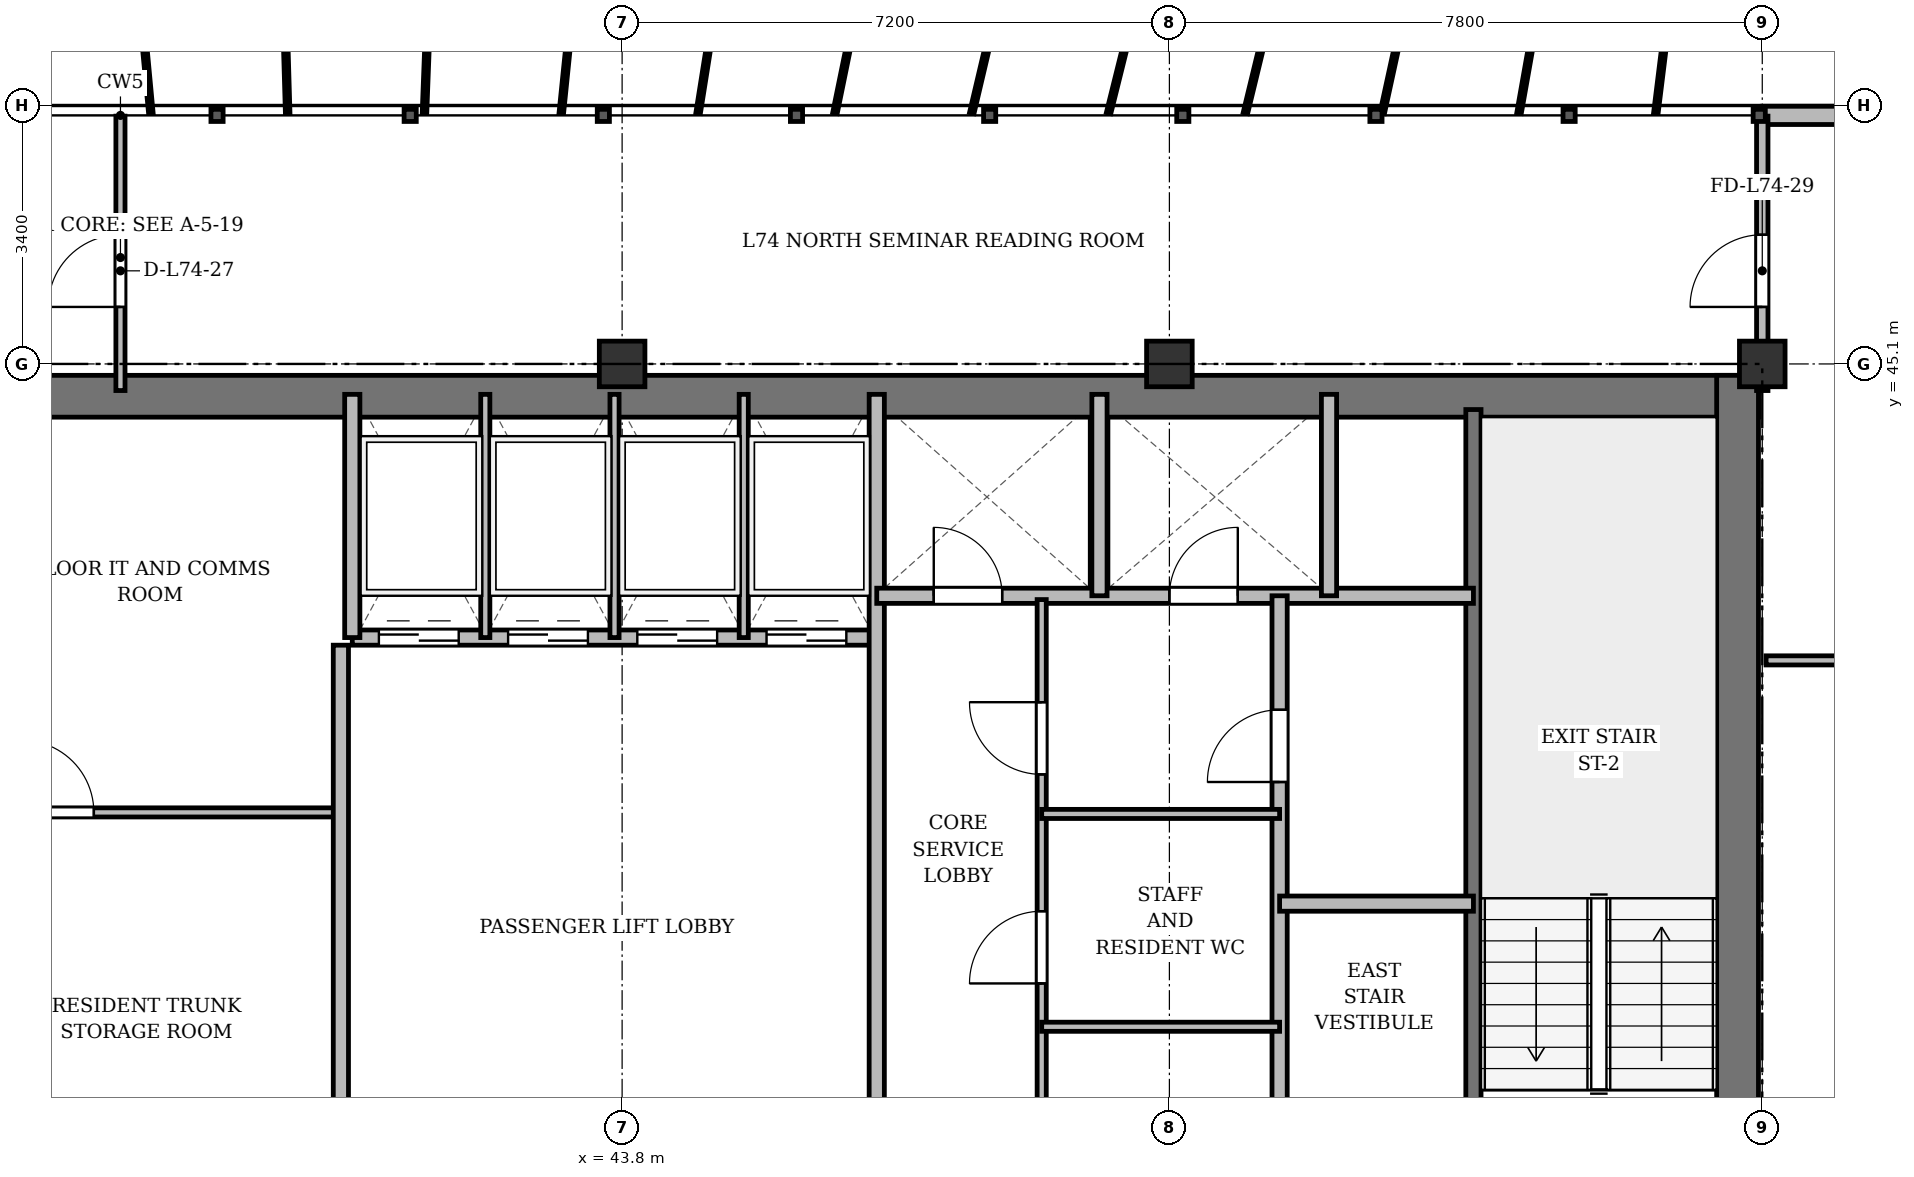
"""IFC4 building model, lengths in metres.
Left out: names, types, materials, properties, quantities, classifications, styles, units other than length and angle.
Written with IfcOpenShell. Run it as: python <this file> out.ifc"""

import sys

from ifc_helpers import new_model, si_unit, direction, frame, frame_2d, origin, origin_2d, place, context, subcontext, project, spatial, rectangle, extrude, source, transform, mapped, element, fill, save


model = new_model("IFC4")
c1 = context("Model", 3, precision=1e-05, world=origin(), true_north=direction((0.0, 1.0)))
c2 = subcontext(c1, "Body", "Model", "MODEL_VIEW")
j1 = project(units=[si_unit("LENGTHUNIT", "METRE"), si_unit("PLANEANGLEUNIT", "RADIAN")], contexts=[c1])
p1 = place(None, origin())
s1 = spatial("IfcSite", under=j1, at=p1, CompositionType="ELEMENT")
p2 = place(p1, origin())
s2 = spatial("IfcBuilding", under=s1, at=p2, CompositionType="ELEMENT")
p3 = place(p2, frame((0.0, 0.0, 284.7)))
s3 = spatial("IfcBuildingStorey", under=s2, at=p3, CompositionType="ELEMENT", Elevation=284.7)
m1 = source(origin(), c2, "Body", "SweptSolid", [
    extrude(rectangle(XDim=0.6, YDim=0.6, at=origin_2d()), origin(), (0.0, 0.0, 1.0), 3.6),
])
for number, where, z_axis, x_axis in (
    (1, (43.8, 45.1, 0.0), (0.0, 0.0, 1.0), (1.0, 0.0, 0.0)),
    (2, (51.0, 45.1, 0.0), (0.0, 0.0, 1.0), (1.0, 0.0, 0.0)),
    (3, (58.8, 45.1, 0.0), (0.0, 0.0, 1.0), (1.0, 0.0, 0.0)),
):
    element("IfcColumn", number, at=place(p3, frame(where, z_axis=z_axis, x_axis=x_axis)), inside=s3, PredefinedType="COLUMN", context=c2, shape_type="MappedRepresentation", body=[
        mapped(m1, transform((0.0, 0.0, 0.0), x_axis=(1.0, 0.0, 0.0), y_axis=(0.0, 1.0, 0.0), z_axis=(0.0, 0.0, 1.0), scale=1.0)),
    ])
p4 = place(p3, frame((58.8, 48.37, 0.0), z_axis=(0.0, 0.0, 1.0), x_axis=(1.0, 0.0, 0.0)))
e4 = element("IfcWall", 4, at=p4, inside=s3, PredefinedType="SOLIDWALL", context=c2, shape_type="SweptSolid", body=[
    extrude(rectangle(XDim=4.3, YDim=0.24, at=frame_2d((2.15, 0.0))), origin(), (0.0, 0.0, 1.0), 3.37),
])
p5 = place(p4, frame((1.46, 0.0, 0.9)))
e5 = element("IfcOpeningElement", 5, at=p5, cuts=e4, PredefinedType="OPENING", context=c2, shape_type="SweptSolid", body=[
    extrude(rectangle(XDim=1.2, YDim=1.65, at=frame_2d((0.6, 0.825))), frame((0.0, 0.13, 0.0), z_axis=(0.0, -1.0, 0.0), x_axis=(1.0, 0.0, 0.0)), (0.0, 0.0, 1.0), 0.26),
])
p6 = place(p3, frame((15.65, 44.675, 0.0), z_axis=(0.0, 0.0, 1.0), x_axis=(1.0, 0.0, 0.0)))
e6 = element("IfcWall", 6, at=p6, inside=s3, PredefinedType="SHEAR", context=c2, shape_type="SweptSolid", body=[
    extrude(rectangle(XDim=43.1, YDim=0.55, at=frame_2d((21.55, 0.0))), origin(), (0.0, 0.0, 1.0), 3.37),
])
p7 = place(p3, frame((58.475, 33.4, 0.0), z_axis=(0.0, 0.0, 1.0), x_axis=(0.0, 1.0, 0.0)))
e7 = element("IfcWall", 7, at=p7, inside=s3, PredefinedType="SHEAR", context=c2, shape_type="SweptSolid", body=[
    extrude(rectangle(XDim=11.55, YDim=0.55, at=frame_2d((5.775, 0.0))), origin(), (0.0, 0.0, 1.0), 3.37),
])
p8 = place(p3, frame((55.0, 33.4, 0.0), z_axis=(0.0, 0.0, 1.0), x_axis=(0.0, 1.0, 0.0)))
e8 = element("IfcWall", 8, at=p8, inside=s3, PredefinedType="SHEAR", context=c2, shape_type="SweptSolid", body=[
    extrude(rectangle(XDim=11.1, YDim=0.2, at=frame_2d((5.55, 0.0))), origin(), (0.0, 0.0, 1.0), 3.37),
])
p9 = place(p8, frame((0.85, 0.0, 0.0)))
e9 = element("IfcOpeningElement", 9, at=p9, cuts=e8, PredefinedType="OPENING", context=c2, shape_type="SweptSolid", body=[
    extrude(rectangle(XDim=1.1, YDim=2.15, at=frame_2d((0.55, 1.075))), frame((0.0, 0.11, 0.0), z_axis=(0.0, -1.0, 0.0), x_axis=(1.0, 0.0, 0.0)), (0.0, 0.0, 1.0), 0.22),
])
p10 = place(p3, frame((33.3, 39.2, 0.0), z_axis=(0.0, 0.0, 1.0), x_axis=(1.0, 0.0, 0.0)))
e10 = element("IfcWall", 10, at=p10, inside=s3, PredefinedType="PARTITIONING", context=c2, shape_type="SweptSolid", body=[
    extrude(rectangle(XDim=6.8, YDim=0.12, at=frame_2d((3.4, 0.0))), origin(), (0.0, 0.0, 1.0), 3.37),
])
p11 = place(p10, frame((2.6, 0.0, 0.0)))
e11 = element("IfcOpeningElement", 11, at=p11, cuts=e10, PredefinedType="OPENING", context=c2, shape_type="SweptSolid", body=[
    extrude(rectangle(XDim=0.95, YDim=2.15, at=frame_2d((0.475, 1.075))), frame((0.0, 0.07, 0.0), z_axis=(0.0, -1.0, 0.0), x_axis=(1.0, 0.0, 0.0)), (0.0, 0.0, 1.0), 0.14),
])
p12 = place(p3, frame((40.1, 33.4, 0.0), z_axis=(0.0, 0.0, 1.0), x_axis=(0.0, 1.0, 0.0)))
e12 = element("IfcWall", 12, at=p12, inside=s3, PredefinedType="SOLIDWALL", context=c2, shape_type="SweptSolid", body=[
    extrude(rectangle(XDim=8.0, YDim=0.2, at=frame_2d((4.0, 0.0))), origin(), (0.0, 0.0, 1.0), 2.92),
])
p13 = place(p3, frame((40.25, 41.5, 0.0), z_axis=(0.0, 0.0, 1.0), x_axis=(1.0, 0.0, 0.0)))
e13 = element("IfcWall", 13, at=p13, inside=s3, PredefinedType="SOLIDWALL", context=c2, shape_type="SweptSolid", body=[
    extrude(rectangle(XDim=6.9, YDim=0.2, at=frame_2d((3.45, 0.0))), origin(), (0.0, 0.0, 1.0), 3.37),
])
p14 = place(p13, frame((0.35, 0.0, 0.0)))
e14 = element("IfcOpeningElement", 14, at=p14, cuts=e13, PredefinedType="OPENING", context=c2, shape_type="SweptSolid", body=[
    extrude(rectangle(XDim=1.05, YDim=2.15, at=frame_2d((0.525, 1.075))), frame((0.0, 0.11, 0.0), z_axis=(0.0, -1.0, 0.0), x_axis=(1.0, 0.0, 0.0)), (0.0, 0.0, 1.0), 0.22),
])
p15 = place(p13, frame((2.05, 0.0, 0.0)))
e15 = element("IfcOpeningElement", 15, at=p15, cuts=e13, PredefinedType="OPENING", context=c2, shape_type="SweptSolid", body=[
    extrude(rectangle(XDim=1.05, YDim=2.15, at=frame_2d((0.525, 1.075))), frame((0.0, 0.11, 0.0), z_axis=(0.0, -1.0, 0.0), x_axis=(1.0, 0.0, 0.0)), (0.0, 0.0, 1.0), 0.22),
])
p16 = place(p13, frame((3.75, 0.0, 0.0)))
e16 = element("IfcOpeningElement", 16, at=p16, cuts=e13, PredefinedType="OPENING", context=c2, shape_type="SweptSolid", body=[
    extrude(rectangle(XDim=1.05, YDim=2.15, at=frame_2d((0.525, 1.075))), frame((0.0, 0.11, 0.0), z_axis=(0.0, -1.0, 0.0), x_axis=(1.0, 0.0, 0.0)), (0.0, 0.0, 1.0), 0.22),
])
p17 = place(p13, frame((5.45, 0.0, 0.0)))
e17 = element("IfcOpeningElement", 17, at=p17, cuts=e13, PredefinedType="OPENING", context=c2, shape_type="SweptSolid", body=[
    extrude(rectangle(XDim=1.05, YDim=2.15, at=frame_2d((0.525, 1.075))), frame((0.0, 0.11, 0.0), z_axis=(0.0, -1.0, 0.0), x_axis=(1.0, 0.0, 0.0)), (0.0, 0.0, 1.0), 0.22),
])
p18 = place(p3, frame((40.25, 41.5, 0.0), z_axis=(0.0, 0.0, 1.0), x_axis=(0.0, 1.0, 0.0)))
e18 = element("IfcWall", 18, at=p18, inside=s3, PredefinedType="SOLIDWALL", context=c2, shape_type="SweptSolid", body=[
    extrude(rectangle(XDim=3.2, YDim=0.2, at=frame_2d((1.6, 0.0))), origin(), (0.0, 0.0, 1.0), 3.37),
])
for number, where, z_axis, x_axis in (
    (19, (42.0, 41.5, 0.0), (0.0, 0.0, 1.0), (0.0, 1.0, 0.0)),
    (20, (43.7, 41.5, 0.0), (0.0, 0.0, 1.0), (0.0, 1.0, 0.0)),
    (21, (45.4, 41.5, 0.0), (0.0, 0.0, 1.0), (0.0, 1.0, 0.0)),
):
    element("IfcWall", number, at=place(p3, frame(where, z_axis=z_axis, x_axis=x_axis)), inside=s3, PredefinedType="PARTITIONING", context=c2, shape_type="SweptSolid", body=[
        extrude(rectangle(XDim=3.2, YDim=0.12, at=frame_2d((1.6, 0.0))), origin(), (0.0, 0.0, 1.0), 3.37),
    ])
p19 = place(p3, frame((47.15, 33.4, 0.0), z_axis=(0.0, 0.0, 1.0), x_axis=(0.0, 1.0, 0.0)))
e22 = element("IfcWall", 22, at=p19, inside=s3, PredefinedType="SOLIDWALL", context=c2, shape_type="SweptSolid", body=[
    extrude(rectangle(XDim=11.3, YDim=0.2, at=frame_2d((5.65, 0.0))), origin(), (0.0, 0.0, 1.0), 2.92),
])
p20 = place(p3, frame((47.15, 42.05, 0.0), z_axis=(0.0, 0.0, 1.0), x_axis=(1.0, 0.0, 0.0)))
e23 = element("IfcWall", 23, at=p20, inside=s3, PredefinedType="SOLIDWALL", context=c2, shape_type="SweptSolid", body=[
    extrude(rectangle(XDim=7.85, YDim=0.2, at=frame_2d((3.925, 0.0))), origin(), (0.0, 0.0, 1.0), 2.87),
])
p21 = place(p20, frame((0.75, 0.0, 0.0)))
e24 = element("IfcOpeningElement", 24, at=p21, cuts=e23, PredefinedType="OPENING", context=c2, shape_type="SweptSolid", body=[
    extrude(rectangle(XDim=0.9, YDim=2.1, at=frame_2d((0.45, 1.05))), frame((0.0, 0.11, 0.0), z_axis=(0.0, -1.0, 0.0), x_axis=(1.0, 0.0, 0.0)), (0.0, 0.0, 1.0), 0.22),
])
p22 = place(p20, frame((3.85, 0.0, 0.0)))
e25 = element("IfcOpeningElement", 25, at=p22, cuts=e23, PredefinedType="OPENING", context=c2, shape_type="SweptSolid", body=[
    extrude(rectangle(XDim=0.9, YDim=2.1, at=frame_2d((0.45, 1.05))), frame((0.0, 0.11, 0.0), z_axis=(0.0, -1.0, 0.0), x_axis=(1.0, 0.0, 0.0)), (0.0, 0.0, 1.0), 0.22),
])
for number, where, z_axis, x_axis in (
    (26, (50.08, 42.05, 0.0), (0.0, 0.0, 1.0), (0.0, 1.0, 0.0)),
    (27, (53.1, 42.05, 0.0), (0.0, 0.0, 1.0), (0.0, 1.0, 0.0)),
):
    element("IfcWall", number, at=place(p3, frame(where, z_axis=z_axis, x_axis=x_axis)), inside=s3, PredefinedType="SOLIDWALL", context=c2, shape_type="SweptSolid", body=[
        extrude(rectangle(XDim=2.65, YDim=0.2, at=frame_2d((1.325, 0.0))), origin(), (0.0, 0.0, 1.0), 3.37),
    ])
p23 = place(p3, frame((52.45, 33.4, 0.0), z_axis=(0.0, 0.0, 1.0), x_axis=(0.0, 1.0, 0.0)))
e28 = element("IfcWall", 28, at=p23, inside=s3, PredefinedType="PARTITIONING", context=c2, shape_type="SweptSolid", body=[
    extrude(rectangle(XDim=8.65, YDim=0.2, at=frame_2d((4.325, 0.0))), origin(), (0.0, 0.0, 1.0), 2.92),
])
p24 = place(p23, frame((6.2, 0.0, 0.0)))
e29 = element("IfcOpeningElement", 29, at=p24, cuts=e28, PredefinedType="OPENING", context=c2, shape_type="SweptSolid", body=[
    extrude(rectangle(XDim=0.95, YDim=2.15, at=frame_2d((0.475, 1.075))), frame((0.0, 0.11, 0.0), z_axis=(0.0, -1.0, 0.0), x_axis=(1.0, 0.0, 0.0)), (0.0, 0.0, 1.0), 0.22),
])
p25 = place(p3, frame((52.45, 38.0, 0.0), z_axis=(0.0, 0.0, 1.0), x_axis=(1.0, 0.0, 0.0)))
e30 = element("IfcWall", 30, at=p25, inside=s3, PredefinedType="PARTITIONING", context=c2, shape_type="SweptSolid", body=[
    extrude(rectangle(XDim=2.55, YDim=0.2, at=frame_2d((1.275, 0.0))), origin(), (0.0, 0.0, 1.0), 3.37),
])
p26 = place(p3, frame((49.32, 33.4, 0.0), z_axis=(0.0, 0.0, 1.0), x_axis=(0.0, 1.0, 0.0)))
e31 = element("IfcWall", 31, at=p26, inside=s3, PredefinedType="PARTITIONING", context=c2, shape_type="SweptSolid", body=[
    extrude(rectangle(XDim=8.6, YDim=0.12, at=frame_2d((4.3, 0.0))), origin(), (0.0, 0.0, 1.0), 2.92),
])
p27 = place(p26, frame((0.85, 0.0, 0.0)))
e32 = element("IfcOpeningElement", 32, at=p27, cuts=e31, PredefinedType="OPENING", context=c2, shape_type="SweptSolid", body=[
    extrude(rectangle(XDim=0.95, YDim=2.15, at=frame_2d((0.475, 1.075))), frame((0.0, 0.07, 0.0), z_axis=(0.0, -1.0, 0.0), x_axis=(1.0, 0.0, 0.0)), (0.0, 0.0, 1.0), 0.14),
])
p28 = place(p26, frame((3.55, 0.0, 0.0)))
e33 = element("IfcOpeningElement", 33, at=p28, cuts=e31, PredefinedType="OPENING", context=c2, shape_type="SweptSolid", body=[
    extrude(rectangle(XDim=0.95, YDim=2.15, at=frame_2d((0.475, 1.075))), frame((0.0, 0.07, 0.0), z_axis=(0.0, -1.0, 0.0), x_axis=(1.0, 0.0, 0.0)), (0.0, 0.0, 1.0), 0.14),
])
p29 = place(p26, frame((6.3, 0.0, 0.0)))
e34 = element("IfcOpeningElement", 34, at=p29, cuts=e31, PredefinedType="OPENING", context=c2, shape_type="SweptSolid", body=[
    extrude(rectangle(XDim=0.95, YDim=2.15, at=frame_2d((0.475, 1.075))), frame((0.0, 0.07, 0.0), z_axis=(0.0, -1.0, 0.0), x_axis=(1.0, 0.0, 0.0)), (0.0, 0.0, 1.0), 0.14),
])
for number, where, z_axis, x_axis in (
    (35, (49.32, 36.38, 0.0), (0.0, 0.0, 1.0), (1.0, 0.0, 0.0)),
    (36, (49.32, 39.18, 0.0), (0.0, 0.0, 1.0), (1.0, 0.0, 0.0)),
):
    element("IfcWall", number, at=place(p3, frame(where, z_axis=z_axis, x_axis=x_axis)), inside=s3, PredefinedType="PARTITIONING", context=c2, shape_type="SweptSolid", body=[
        extrude(rectangle(XDim=3.13, YDim=0.12, at=frame_2d((1.565, 0.0))), origin(), (0.0, 0.0, 1.0), 2.87),
    ])
p30 = place(p3, frame((58.85, 41.2, 0.0), z_axis=(0.0, 0.0, 1.0), x_axis=(1.0, 0.0, 0.0)))
e37 = element("IfcWall", 37, at=p30, inside=s3, PredefinedType="PARTITIONING", context=c2, shape_type="SweptSolid", body=[
    extrude(rectangle(XDim=7.05, YDim=0.12, at=frame_2d((3.525, 0.0))), origin(), (0.0, 0.0, 1.0), 2.87),
])
p31 = place(p30, frame((2.958, 0.0, 0.0)))
e38 = element("IfcOpeningElement", 38, at=p31, cuts=e37, PredefinedType="OPENING", context=c2, shape_type="SweptSolid", body=[
    extrude(rectangle(XDim=0.95, YDim=2.15, at=frame_2d((0.475, 1.075))), frame((0.0, 0.07, 0.0), z_axis=(0.0, -1.0, 0.0), x_axis=(1.0, 0.0, 0.0)), (0.0, 0.0, 1.0), 0.14),
])
p32 = place(p3, frame((37.2, 44.75, 0.0), z_axis=(0.0, 0.0, 1.0), x_axis=(0.0, 1.0, 0.0)))
e39 = element("IfcWall", 39, at=p32, inside=s3, PredefinedType="PARTITIONING", context=c2, shape_type="SweptSolid", body=[
    extrude(rectangle(XDim=3.61, YDim=0.12, at=frame_2d((1.805, 0.0))), origin(), (0.0, 0.0, 1.0), 2.92),
])
p33 = place(p32, frame((1.1, 0.0, 0.0)))
e40 = element("IfcOpeningElement", 40, at=p33, cuts=e39, PredefinedType="OPENING", context=c2, shape_type="SweptSolid", body=[
    extrude(rectangle(XDim=0.95, YDim=2.15, at=frame_2d((0.475, 1.075))), frame((0.0, 0.07, 0.0), z_axis=(0.0, -1.0, 0.0), x_axis=(1.0, 0.0, 0.0)), (0.0, 0.0, 1.0), 0.14),
])
p34 = place(p3, frame((58.8, 44.75, 0.0), z_axis=(0.0, 0.0, 1.0), x_axis=(0.0, 1.0, 0.0)))
e41 = element("IfcWall", 41, at=p34, inside=s3, PredefinedType="PARTITIONING", context=c2, shape_type="SweptSolid", body=[
    extrude(rectangle(XDim=3.61, YDim=0.15, at=frame_2d((1.805, 0.0))), origin(), (0.0, 0.0, 1.0), 2.87),
])
p35 = place(p34, frame((1.1, 0.0, 0.0)))
e42 = element("IfcOpeningElement", 42, at=p35, cuts=e41, PredefinedType="OPENING", context=c2, shape_type="SweptSolid", body=[
    extrude(rectangle(XDim=0.95, YDim=2.15, at=frame_2d((0.475, 1.075))), frame((0.0, 0.085, 0.0), z_axis=(0.0, -1.0, 0.0), x_axis=(1.0, 0.0, 0.0)), (0.0, 0.0, 1.0), 0.17),
])
m2 = source(origin(), c2, "Body", "SweptSolid", [
    extrude(rectangle(XDim=0.95, YDim=2.15, at=frame_2d((0.475, 1.075))), frame((0.0, 0.025, 0.0), z_axis=(0.0, -1.0, 0.0), x_axis=(1.0, 0.0, 0.0)), (0.0, 0.0, 1.0), 0.05),
])
p36 = place(p11, origin())
e43 = element("IfcDoor", 43, at=p36, inside=s3, OperationType="SINGLE_SWING_LEFT", PredefinedType="DOOR", context=c2, shape_type="MappedRepresentation", body=[
    mapped(m2, transform((0.0, 0.0, 0.0), x_axis=(1.0, 0.0, 0.0), y_axis=(0.0, 1.0, 0.0), z_axis=(0.0, 0.0, 1.0), scale=1.0)),
])
fill(e11, e43)
m3 = source(origin(), c2, "Body", "SweptSolid", [
    extrude(rectangle(XDim=1.05, YDim=2.15, at=frame_2d((0.525, 1.075))), frame((0.0, 0.025, 0.0), z_axis=(0.0, -1.0, 0.0), x_axis=(1.0, 0.0, 0.0)), (0.0, 0.0, 1.0), 0.05),
])
p37 = place(p14, origin())
e44 = element("IfcDoor", 44, at=p37, inside=s3, OperationType="DOUBLE_DOOR_SLIDING", PredefinedType="DOOR", context=c2, shape_type="MappedRepresentation", body=[
    mapped(m3, transform((0.0, 0.0, 0.0), x_axis=(1.0, 0.0, 0.0), y_axis=(0.0, 1.0, 0.0), z_axis=(0.0, 0.0, 1.0), scale=1.0)),
])
fill(e14, e44)
p38 = place(p15, origin())
e45 = element("IfcDoor", 45, at=p38, inside=s3, OperationType="DOUBLE_DOOR_SLIDING", PredefinedType="DOOR", context=c2, shape_type="MappedRepresentation", body=[
    mapped(m3, transform((0.0, 0.0, 0.0), x_axis=(1.0, 0.0, 0.0), y_axis=(0.0, 1.0, 0.0), z_axis=(0.0, 0.0, 1.0), scale=1.0)),
])
fill(e15, e45)
p39 = place(p16, origin())
e46 = element("IfcDoor", 46, at=p39, inside=s3, OperationType="DOUBLE_DOOR_SLIDING", PredefinedType="DOOR", context=c2, shape_type="MappedRepresentation", body=[
    mapped(m3, transform((0.0, 0.0, 0.0), x_axis=(1.0, 0.0, 0.0), y_axis=(0.0, 1.0, 0.0), z_axis=(0.0, 0.0, 1.0), scale=1.0)),
])
fill(e16, e46)
p40 = place(p17, origin())
e47 = element("IfcDoor", 47, at=p40, inside=s3, OperationType="DOUBLE_DOOR_SLIDING", PredefinedType="DOOR", context=c2, shape_type="MappedRepresentation", body=[
    mapped(m3, transform((0.0, 0.0, 0.0), x_axis=(1.0, 0.0, 0.0), y_axis=(0.0, 1.0, 0.0), z_axis=(0.0, 0.0, 1.0), scale=1.0)),
])
fill(e17, e47)
m4 = source(origin(), c2, "Body", "SweptSolid", [
    extrude(rectangle(XDim=0.9, YDim=2.1, at=frame_2d((0.45, 1.05))), frame((0.0, 0.025, 0.0), z_axis=(0.0, -1.0, 0.0), x_axis=(1.0, 0.0, 0.0)), (0.0, 0.0, 1.0), 0.05),
])
p41 = place(p21, origin())
e48 = element("IfcDoor", 48, at=p41, inside=s3, OperationType="SINGLE_SWING_LEFT", PredefinedType="DOOR", context=c2, shape_type="MappedRepresentation", body=[
    mapped(m4, transform((0.0, 0.0, 0.0), x_axis=(1.0, 0.0, 0.0), y_axis=(0.0, 1.0, 0.0), z_axis=(0.0, 0.0, 1.0), scale=1.0)),
])
fill(e24, e48)
p42 = place(p22, origin())
e49 = element("IfcDoor", 49, at=p42, inside=s3, OperationType="SINGLE_SWING_RIGHT", PredefinedType="DOOR", context=c2, shape_type="MappedRepresentation", body=[
    mapped(m4, transform((0.0, 0.0, 0.0), x_axis=(1.0, 0.0, 0.0), y_axis=(0.0, 1.0, 0.0), z_axis=(0.0, 0.0, 1.0), scale=1.0)),
])
fill(e25, e49)
p43 = place(p24, origin())
e50 = element("IfcDoor", 50, at=p43, inside=s3, OperationType="SINGLE_SWING_LEFT", PredefinedType="DOOR", context=c2, shape_type="MappedRepresentation", body=[
    mapped(m2, transform((0.0, 0.0, 0.0), x_axis=(1.0, 0.0, 0.0), y_axis=(0.0, 1.0, 0.0), z_axis=(0.0, 0.0, 1.0), scale=1.0)),
])
fill(e29, e50)
p44 = place(p28, origin())
e51 = element("IfcDoor", 51, at=p44, inside=s3, OperationType="SINGLE_SWING_LEFT", PredefinedType="DOOR", context=c2, shape_type="MappedRepresentation", body=[
    mapped(m2, transform((0.0, 0.0, 0.0), x_axis=(1.0, 0.0, 0.0), y_axis=(0.0, 1.0, 0.0), z_axis=(0.0, 0.0, 1.0), scale=1.0)),
])
fill(e33, e51)
p45 = place(p29, origin())
e52 = element("IfcDoor", 52, at=p45, inside=s3, OperationType="SINGLE_SWING_RIGHT", PredefinedType="DOOR", context=c2, shape_type="MappedRepresentation", body=[
    mapped(m2, transform((0.0, 0.0, 0.0), x_axis=(1.0, 0.0, 0.0), y_axis=(0.0, 1.0, 0.0), z_axis=(0.0, 0.0, 1.0), scale=1.0)),
])
fill(e34, e52)
p46 = place(p33, origin())
e53 = element("IfcDoor", 53, at=p46, inside=s3, OperationType="SINGLE_SWING_LEFT", PredefinedType="DOOR", context=c2, shape_type="MappedRepresentation", body=[
    mapped(m2, transform((0.0, 0.0, 0.0), x_axis=(1.0, 0.0, 0.0), y_axis=(0.0, 1.0, 0.0), z_axis=(0.0, 0.0, 1.0), scale=1.0)),
])
fill(e40, e53)
p47 = place(p35, origin())
e54 = element("IfcDoor", 54, at=p47, inside=s3, OperationType="SINGLE_SWING_LEFT", PredefinedType="DOOR", context=c2, shape_type="MappedRepresentation", body=[
    mapped(m2, transform((0.0, 0.0, 0.0), x_axis=(1.0, 0.0, 0.0), y_axis=(0.0, 1.0, 0.0), z_axis=(0.0, 0.0, 1.0), scale=1.0)),
])
fill(e42, e54)
save(model, sys.argv[1])
